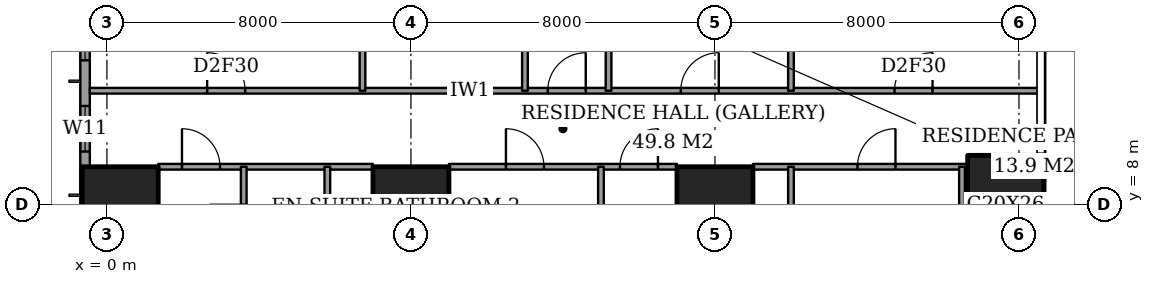
"""IFC4 building model, lengths in metres.
Left out: names, types, materials, properties, quantities, classifications, styles, units other than length and angle.
Written with IfcOpenShell. Run it as: python <this file> out.ifc"""

import sys

from ifc_helpers import new_model, si_unit, direction, frame, frame_2d, origin, origin_2d, place, context, subcontext, project, spatial, rectangle, extrude, element, fill, save


model = new_model("IFC4")
c1 = context("Model", 3, precision=1e-05, world=origin(), true_north=direction((0.0, 1.0)))
c2 = subcontext(c1, "Body", "Model", "MODEL_VIEW")
j1 = project(units=[si_unit("LENGTHUNIT", "METRE"), si_unit("PLANEANGLEUNIT", "RADIAN")], contexts=[c1])
p1 = place(None, origin())
s1 = spatial("IfcSite", under=j1, at=p1, CompositionType="ELEMENT")
p2 = place(p1, origin())
s2 = spatial("IfcBuilding", under=s1, at=p2, CompositionType="ELEMENT")
p3 = place(p2, frame((0.0, 0.0, 146.6)))
s3 = spatial("IfcBuildingStorey", under=s2, at=p3, CompositionType="ELEMENT", Elevation=146.6)
for number, where, z_axis, x_axis in (
    (1, (0.35, 8.0, 0.0), (0.0, 0.0, 1.0), (1.0, 0.0, 0.0)),
    (2, (8.0, 8.0, 0.0), (0.0, 0.0, 1.0), (1.0, 0.0, 0.0)),
    (3, (16.0, 8.0, 0.0), (0.0, 0.0, 1.0), (1.0, 0.0, 0.0)),
):
    element("IfcColumn", number, at=place(p3, frame(where, z_axis=z_axis, x_axis=x_axis)), inside=s3, PredefinedType="COLUMN", context=c2, shape_type="SweptSolid", body=[
        extrude(rectangle(XDim=2.0, YDim=2.0, at=origin_2d()), origin(), (0.0, 0.0, 1.0), 3.6),
    ])
p4 = place(p3, frame((23.65, 8.0, 0.0), z_axis=(0.0, 0.0, 1.0), x_axis=(1.0, 0.0, 0.0)))
e4 = element("IfcColumn", 4, at=p4, inside=s3, PredefinedType="COLUMN", context=c2, shape_type="SweptSolid", body=[
    extrude(rectangle(XDim=2.0, YDim=2.6, at=origin_2d()), origin(), (0.0, 0.0, 1.0), 3.6),
])
p5 = place(p3, frame((-0.575, 44.825, 0.0), z_axis=(0.0, 0.0, 1.0), x_axis=(0.0, -1.0, 0.0)))
e5 = element("IfcWall", 5, at=p5, inside=s3, PredefinedType="SOLIDWALL", context=c2, shape_type="SweptSolid", body=[
    extrude(rectangle(XDim=41.65, YDim=0.25, at=frame_2d((20.825, 0.0))), origin(), (0.0, 0.0, 1.0), 3.6),
])
p6 = place(p5, frame((0.775, 0.0, 0.4)))
e6 = element("IfcOpeningElement", 6, at=p6, cuts=e5, PredefinedType="OPENING", context=c2, shape_type="SweptSolid", body=[
    extrude(rectangle(XDim=2.4, YDim=2.2, at=frame_2d((1.2, 1.1))), frame((0.0, 0.135, 0.0), z_axis=(0.0, -1.0, 0.0), x_axis=(1.0, 0.0, 0.0)), (0.0, 0.0, 1.0), 0.27),
])
p7 = place(p5, frame((6.1, 0.0, 0.4)))
e7 = element("IfcOpeningElement", 7, at=p7, cuts=e5, PredefinedType="OPENING", context=c2, shape_type="SweptSolid", body=[
    extrude(rectangle(XDim=1.2, YDim=2.2, at=frame_2d((0.6, 1.1))), frame((0.0, 0.135, 0.0), z_axis=(0.0, -1.0, 0.0), x_axis=(1.0, 0.0, 0.0)), (0.0, 0.0, 1.0), 0.27),
])
p8 = place(p5, frame((8.425, 0.0, 0.4)))
e8 = element("IfcOpeningElement", 8, at=p8, cuts=e5, PredefinedType="OPENING", context=c2, shape_type="SweptSolid", body=[
    extrude(rectangle(XDim=2.4, YDim=2.2, at=frame_2d((1.2, 1.1))), frame((0.0, 0.135, 0.0), z_axis=(0.0, -1.0, 0.0), x_axis=(1.0, 0.0, 0.0)), (0.0, 0.0, 1.0), 0.27),
])
p9 = place(p5, frame((15.625, 0.0, 0.4)))
e9 = element("IfcOpeningElement", 9, at=p9, cuts=e5, PredefinedType="OPENING", context=c2, shape_type="SweptSolid", body=[
    extrude(rectangle(XDim=2.4, YDim=2.2, at=frame_2d((1.2, 1.1))), frame((0.0, 0.135, 0.0), z_axis=(0.0, -1.0, 0.0), x_axis=(1.0, 0.0, 0.0)), (0.0, 0.0, 1.0), 0.27),
])
p10 = place(p5, frame((23.625, 0.0, 0.4)))
e10 = element("IfcOpeningElement", 10, at=p10, cuts=e5, PredefinedType="OPENING", context=c2, shape_type="SweptSolid", body=[
    extrude(rectangle(XDim=2.4, YDim=2.2, at=frame_2d((1.2, 1.1))), frame((0.0, 0.135, 0.0), z_axis=(0.0, -1.0, 0.0), x_axis=(1.0, 0.0, 0.0)), (0.0, 0.0, 1.0), 0.27),
])
p11 = place(p5, frame((30.625, 0.0, 0.4)))
e11 = element("IfcOpeningElement", 11, at=p11, cuts=e5, PredefinedType="OPENING", context=c2, shape_type="SweptSolid", body=[
    extrude(rectangle(XDim=2.4, YDim=2.2, at=frame_2d((1.2, 1.1))), frame((0.0, 0.135, 0.0), z_axis=(0.0, -1.0, 0.0), x_axis=(1.0, 0.0, 0.0)), (0.0, 0.0, 1.0), 0.27),
])
p12 = place(p5, frame((34.225, 0.0, 0.4)))
e12 = element("IfcOpeningElement", 12, at=p12, cuts=e5, PredefinedType="OPENING", context=c2, shape_type="SweptSolid", body=[
    extrude(rectangle(XDim=1.2, YDim=2.2, at=frame_2d((0.6, 1.1))), frame((0.0, 0.135, 0.0), z_axis=(0.0, -1.0, 0.0), x_axis=(1.0, 0.0, 0.0)), (0.0, 0.0, 1.0), 0.27),
])
p13 = place(p5, frame((38.475, 0.0, 0.4)))
e13 = element("IfcOpeningElement", 13, at=p13, cuts=e5, PredefinedType="OPENING", context=c2, shape_type="SweptSolid", body=[
    extrude(rectangle(XDim=2.4, YDim=2.2, at=frame_2d((1.2, 1.1))), frame((0.0, 0.135, 0.0), z_axis=(0.0, -1.0, 0.0), x_axis=(1.0, 0.0, 0.0)), (0.0, 0.0, 1.0), 0.27),
])
p14 = place(p3, frame((1.35, 9.0, 0.0), z_axis=(0.0, 0.0, 1.0), x_axis=(1.0, 0.0, 0.0)))
e14 = element("IfcWall", 14, at=p14, inside=s3, PredefinedType="PARTITIONING", context=c2, shape_type="SweptSolid", body=[
    extrude(rectangle(XDim=5.65, YDim=0.15, at=frame_2d((2.825, 0.0))), origin(), (0.0, 0.0, 1.0), 3.35),
])
p15 = place(p14, frame((0.625, 0.0, 0.0)))
e15 = element("IfcOpeningElement", 15, at=p15, cuts=e14, PredefinedType="OPENING", context=c2, shape_type="SweptSolid", body=[
    extrude(rectangle(XDim=1.0, YDim=2.1, at=frame_2d((0.5, 1.05))), frame((0.0, 0.085, 0.0), z_axis=(0.0, -1.0, 0.0), x_axis=(1.0, 0.0, 0.0)), (0.0, 0.0, 1.0), 0.17),
])
p16 = place(p3, frame((9.0, 9.0, 0.0), z_axis=(0.0, 0.0, 1.0), x_axis=(1.0, 0.0, 0.0)))
e16 = element("IfcWall", 16, at=p16, inside=s3, PredefinedType="PARTITIONING", context=c2, shape_type="SweptSolid", body=[
    extrude(rectangle(XDim=6.0, YDim=0.15, at=frame_2d((3.0, 0.0))), origin(), (0.0, 0.0, 1.0), 3.35),
])
p17 = place(p16, frame((1.5, 0.0, 0.0)))
e17 = element("IfcOpeningElement", 17, at=p17, cuts=e16, PredefinedType="OPENING", context=c2, shape_type="SweptSolid", body=[
    extrude(rectangle(XDim=1.0, YDim=2.1, at=frame_2d((0.5, 1.05))), frame((0.0, 0.085, 0.0), z_axis=(0.0, -1.0, 0.0), x_axis=(1.0, 0.0, 0.0)), (0.0, 0.0, 1.0), 0.17),
])
p18 = place(p16, frame((4.5, 0.0, 0.0)))
e18 = element("IfcOpeningElement", 18, at=p18, cuts=e16, PredefinedType="OPENING", context=c2, shape_type="SweptSolid", body=[
    extrude(rectangle(XDim=1.0, YDim=2.1, at=frame_2d((0.5, 1.05))), frame((0.0, 0.085, 0.0), z_axis=(0.0, -1.0, 0.0), x_axis=(1.0, 0.0, 0.0)), (0.0, 0.0, 1.0), 0.17),
])
p19 = place(p3, frame((17.0, 9.0, 0.0), z_axis=(0.0, 0.0, 1.0), x_axis=(1.0, 0.0, 0.0)))
e19 = element("IfcWall", 19, at=p19, inside=s3, PredefinedType="PARTITIONING", context=c2, shape_type="SweptSolid", body=[
    extrude(rectangle(XDim=5.65, YDim=0.15, at=frame_2d((2.825, 0.0))), origin(), (0.0, 0.0, 1.0), 3.35),
])
p20 = place(p19, frame((2.75, 0.0, 0.0)))
e20 = element("IfcOpeningElement", 20, at=p20, cuts=e19, PredefinedType="OPENING", context=c2, shape_type="SweptSolid", body=[
    extrude(rectangle(XDim=1.0, YDim=2.1, at=frame_2d((0.5, 1.05))), frame((0.0, 0.085, 0.0), z_axis=(0.0, -1.0, 0.0), x_axis=(1.0, 0.0, 0.0)), (0.0, 0.0, 1.0), 0.17),
])
p21 = place(p3, frame((-0.45, 11.0, 0.0), z_axis=(0.0, 0.0, 1.0), x_axis=(1.0, 0.0, 0.0)))
e21 = element("IfcWall", 21, at=p21, inside=s3, PredefinedType="PARTITIONING", context=c2, shape_type="SweptSolid", body=[
    extrude(rectangle(XDim=25.011, YDim=0.15, at=frame_2d((12.505, 0.0))), origin(), (0.0, 0.0, 1.0), 3.35),
])
p22 = place(p21, frame((12.05, 0.0, 0.0)))
e22 = element("IfcOpeningElement", 22, at=p22, cuts=e21, PredefinedType="OPENING", context=c2, shape_type="SweptSolid", body=[
    extrude(rectangle(XDim=1.0, YDim=2.1, at=frame_2d((0.5, 1.05))), frame((0.0, 0.085, 0.0), z_axis=(0.0, -1.0, 0.0), x_axis=(1.0, 0.0, 0.0)), (0.0, 0.0, 1.0), 0.17),
])
p23 = place(p21, frame((3.087, 0.0, 0.0)))
e23 = element("IfcOpeningElement", 23, at=p23, cuts=e21, PredefinedType="OPENING", context=c2, shape_type="SweptSolid", body=[
    extrude(rectangle(XDim=1.0, YDim=2.1, at=frame_2d((0.5, 1.05))), frame((0.0, 0.085, 0.0), z_axis=(0.0, -1.0, 0.0), x_axis=(1.0, 0.0, 0.0)), (0.0, 0.0, 1.0), 0.17),
])
p24 = place(p21, frame((15.55, 0.0, 0.0)))
e24 = element("IfcOpeningElement", 24, at=p24, cuts=e21, PredefinedType="OPENING", context=c2, shape_type="SweptSolid", body=[
    extrude(rectangle(XDim=1.0, YDim=2.1, at=frame_2d((0.5, 1.05))), frame((0.0, 0.085, 0.0), z_axis=(0.0, -1.0, 0.0), x_axis=(1.0, 0.0, 0.0)), (0.0, 0.0, 1.0), 0.17),
])
p25 = place(p21, frame((21.175, 0.0, 0.0)))
e25 = element("IfcOpeningElement", 25, at=p25, cuts=e21, PredefinedType="OPENING", context=c2, shape_type="SweptSolid", body=[
    extrude(rectangle(XDim=1.0, YDim=2.1, at=frame_2d((0.5, 1.05))), frame((0.0, 0.085, 0.0), z_axis=(0.0, -1.0, 0.0), x_axis=(1.0, 0.0, 0.0)), (0.0, 0.0, 1.0), 0.17),
])
p26 = place(p3, frame((3.6, 6.1, 0.0), z_axis=(0.0, 0.0, 1.0), x_axis=(0.0, 1.0, 0.0)))
e26 = element("IfcWall", 26, at=p26, inside=s3, PredefinedType="PARTITIONING", context=c2, shape_type="SweptSolid", body=[
    extrude(rectangle(XDim=2.9, YDim=0.15, at=frame_2d((1.45, 0.0))), origin(), (0.0, 0.0, 1.0), 3.35),
])
p27 = place(p26, frame((1.0, 0.0, 0.0)))
e27 = element("IfcOpeningElement", 27, at=p27, cuts=e26, PredefinedType="OPENING", context=c2, shape_type="SweptSolid", body=[
    extrude(rectangle(XDim=0.9, YDim=2.1, at=frame_2d((0.45, 1.05))), frame((0.0, 0.085, 0.0), z_axis=(0.0, -1.0, 0.0), x_axis=(1.0, 0.0, 0.0)), (0.0, 0.0, 1.0), 0.17),
])
p28 = place(p3, frame((5.8, -0.45, 0.0), z_axis=(0.0, 0.0, 1.0), x_axis=(0.0, 1.0, 0.0)))
e28 = element("IfcWall", 28, at=p28, inside=s3, PredefinedType="PARTITIONING", context=c2, shape_type="SweptSolid", body=[
    extrude(rectangle(XDim=9.45, YDim=0.15, at=frame_2d((4.725, 0.0))), origin(), (0.0, 0.0, 1.0), 3.35),
])
p29 = place(p3, frame((6.725, 11.0, 0.0), z_axis=(0.0, 0.0, 1.0), x_axis=(0.0, 1.0, 0.0)))
e29 = element("IfcWall", 29, at=p29, inside=s3, PredefinedType="PARTITIONING", context=c2, shape_type="SweptSolid", body=[
    extrude(rectangle(XDim=3.8, YDim=0.15, at=frame_2d((1.9, 0.0))), origin(), (0.0, 0.0, 1.0), 3.35),
])
p30 = place(p29, frame((1.15, 0.0, 0.0)))
e30 = element("IfcOpeningElement", 30, at=p30, cuts=e29, PredefinedType="OPENING", context=c2, shape_type="SweptSolid", body=[
    extrude(rectangle(XDim=0.9, YDim=2.1, at=frame_2d((0.45, 1.05))), frame((0.0, 0.085, 0.0), z_axis=(0.0, -1.0, 0.0), x_axis=(1.0, 0.0, 0.0)), (0.0, 0.0, 1.0), 0.17),
])
p31 = place(p3, frame((11.0, 11.0, 0.0), z_axis=(0.0, 0.0, 1.0), x_axis=(0.0, 1.0, 0.0)))
e31 = element("IfcWall", 31, at=p31, inside=s3, PredefinedType="PARTITIONING", context=c2, shape_type="SweptSolid", body=[
    extrude(rectangle(XDim=10.6, YDim=0.15, at=frame_2d((5.3, 0.0))), origin(), (0.0, 0.0, 1.0), 3.35),
])
p32 = place(p31, frame((7.962, 0.0, 0.0)))
e32 = element("IfcOpeningElement", 32, at=p32, cuts=e31, PredefinedType="OPENING", context=c2, shape_type="SweptSolid", body=[
    extrude(rectangle(XDim=1.0, YDim=2.1, at=frame_2d((0.5, 1.05))), frame((0.0, 0.085, 0.0), z_axis=(0.0, -1.0, 0.0), x_axis=(1.0, 0.0, 0.0)), (0.0, 0.0, 1.0), 0.17),
])
p33 = place(p3, frame((13.0, -0.45, 0.0), z_axis=(0.0, 0.0, 1.0), x_axis=(0.0, 1.0, 0.0)))
e33 = element("IfcWall", 33, at=p33, inside=s3, PredefinedType="PARTITIONING", context=c2, shape_type="SweptSolid", body=[
    extrude(rectangle(XDim=9.45, YDim=0.15, at=frame_2d((4.725, 0.0))), origin(), (0.0, 0.0, 1.0), 3.35),
])
p34 = place(p3, frame((13.2, 11.0, 0.0), z_axis=(0.0, 0.0, 1.0), x_axis=(0.0, 1.0, 0.0)))
e34 = element("IfcWall", 34, at=p34, inside=s3, PredefinedType="PARTITIONING", context=c2, shape_type="SweptSolid", body=[
    extrude(rectangle(XDim=6.325, YDim=0.15, at=frame_2d((3.163, 0.0))), origin(), (0.0, 0.0, 1.0), 3.35),
])
p35 = place(p3, frame((18.0, -0.45, 0.0), z_axis=(0.0, 0.0, 1.0), x_axis=(0.0, 1.0, 0.0)))
e35 = element("IfcWall", 35, at=p35, inside=s3, PredefinedType="PARTITIONING", context=c2, shape_type="SweptSolid", body=[
    extrude(rectangle(XDim=9.45, YDim=0.15, at=frame_2d((4.725, 0.0))), origin(), (0.0, 0.0, 1.0), 3.35),
])
p36 = place(p3, frame((18.0, 11.0, 0.0), z_axis=(0.0, 0.0, 1.0), x_axis=(0.0, 1.0, 0.0)))
e36 = element("IfcWall", 36, at=p36, inside=s3, PredefinedType="PARTITIONING", context=c2, shape_type="SweptSolid", body=[
    extrude(rectangle(XDim=6.325, YDim=0.15, at=frame_2d((3.163, 0.0))), origin(), (0.0, 0.0, 1.0), 3.35),
])
p37 = place(p3, frame((22.5, -0.45, 0.0), z_axis=(0.0, 0.0, 1.0), x_axis=(0.0, 1.0, 0.0)))
e37 = element("IfcWall", 37, at=p37, inside=s3, PredefinedType="PARTITIONING", context=c2, shape_type="SweptSolid", body=[
    extrude(rectangle(XDim=9.45, YDim=0.15, at=frame_2d((4.725, 0.0))), origin(), (0.0, 0.0, 1.0), 3.35),
])
p38 = place(p37, frame((4.275, 0.0, 0.0)))
e38 = element("IfcOpeningElement", 38, at=p38, cuts=e37, PredefinedType="OPENING", context=c2, shape_type="SweptSolid", body=[
    extrude(rectangle(XDim=0.9, YDim=2.1, at=frame_2d((0.45, 1.05))), frame((0.0, 0.085, 0.0), z_axis=(0.0, -1.0, 0.0), x_axis=(1.0, 0.0, 0.0)), (0.0, 0.0, 1.0), 0.17),
])
p39 = place(p11, origin())
e39 = element("IfcWindow", 39, at=p39, inside=s3, PartitioningType="SINGLE_PANEL", PredefinedType="WINDOW", context=c2, shape_type="SweptSolid", body=[
    extrude(rectangle(XDim=2.4, YDim=2.2, at=frame_2d((1.2, 1.1))), frame((0.0, 0.03, 0.0), z_axis=(0.0, -1.0, 0.0), x_axis=(1.0, 0.0, 0.0)), (0.0, 0.0, 1.0), 0.06),
])
fill(e11, e39)
p40 = place(p12, origin())
e40 = element("IfcWindow", 40, at=p40, inside=s3, PartitioningType="SINGLE_PANEL", PredefinedType="WINDOW", context=c2, shape_type="SweptSolid", body=[
    extrude(rectangle(XDim=1.2, YDim=2.2, at=frame_2d((0.6, 1.1))), frame((0.0, 0.03, 0.0), z_axis=(0.0, -1.0, 0.0), x_axis=(1.0, 0.0, 0.0)), (0.0, 0.0, 1.0), 0.06),
])
fill(e12, e40)
p41 = place(p15, origin())
e41 = element("IfcDoor", 41, at=p41, inside=s3, OperationType="SINGLE_SWING_RIGHT", PredefinedType="DOOR", context=c2, shape_type="SweptSolid", body=[
    extrude(rectangle(XDim=1.0, YDim=2.1, at=frame_2d((0.5, 1.05))), frame((0.0, 0.025, 0.0), z_axis=(0.0, -1.0, 0.0), x_axis=(1.0, 0.0, 0.0)), (0.0, 0.0, 1.0), 0.05),
])
fill(e15, e41)
p42 = place(p17, origin())
e42 = element("IfcDoor", 42, at=p42, inside=s3, OperationType="SINGLE_SWING_RIGHT", PredefinedType="DOOR", context=c2, shape_type="SweptSolid", body=[
    extrude(rectangle(XDim=1.0, YDim=2.1, at=frame_2d((0.5, 1.05))), frame((0.0, 0.025, 0.0), z_axis=(0.0, -1.0, 0.0), x_axis=(1.0, 0.0, 0.0)), (0.0, 0.0, 1.0), 0.05),
])
fill(e17, e42)
p43 = place(p18, origin())
e43 = element("IfcDoor", 43, at=p43, inside=s3, OperationType="SINGLE_SWING_LEFT", PredefinedType="DOOR", context=c2, shape_type="SweptSolid", body=[
    extrude(rectangle(XDim=1.0, YDim=2.1, at=frame_2d((0.5, 1.05))), frame((0.0, 0.025, 0.0), z_axis=(0.0, -1.0, 0.0), x_axis=(1.0, 0.0, 0.0)), (0.0, 0.0, 1.0), 0.05),
])
fill(e18, e43)
p44 = place(p20, origin())
e44 = element("IfcDoor", 44, at=p44, inside=s3, OperationType="SINGLE_SWING_LEFT", PredefinedType="DOOR", context=c2, shape_type="SweptSolid", body=[
    extrude(rectangle(XDim=1.0, YDim=2.1, at=frame_2d((0.5, 1.05))), frame((0.0, 0.025, 0.0), z_axis=(0.0, -1.0, 0.0), x_axis=(1.0, 0.0, 0.0)), (0.0, 0.0, 1.0), 0.05),
])
fill(e20, e44)
p45 = place(p22, origin())
e45 = element("IfcDoor", 45, at=p45, inside=s3, OperationType="SINGLE_SWING_LEFT", PredefinedType="DOOR", context=c2, shape_type="SweptSolid", body=[
    extrude(rectangle(XDim=1.0, YDim=2.1, at=frame_2d((0.5, 1.05))), frame((0.0, 0.025, 0.0), z_axis=(0.0, -1.0, 0.0), x_axis=(1.0, 0.0, 0.0)), (0.0, 0.0, 1.0), 0.05),
])
fill(e22, e45)
p46 = place(p23, origin())
e46 = element("IfcDoor", 46, at=p46, inside=s3, OperationType="SINGLE_SWING_RIGHT", PredefinedType="DOOR", context=c2, shape_type="SweptSolid", body=[
    extrude(rectangle(XDim=1.0, YDim=2.1, at=frame_2d((0.5, 1.05))), frame((0.0, 0.025, 0.0), z_axis=(0.0, -1.0, 0.0), x_axis=(1.0, 0.0, 0.0)), (0.0, 0.0, 1.0), 0.05),
])
fill(e23, e46)
p47 = place(p24, origin())
e47 = element("IfcDoor", 47, at=p47, inside=s3, OperationType="SINGLE_SWING_LEFT", PredefinedType="DOOR", context=c2, shape_type="SweptSolid", body=[
    extrude(rectangle(XDim=1.0, YDim=2.1, at=frame_2d((0.5, 1.05))), frame((0.0, 0.025, 0.0), z_axis=(0.0, -1.0, 0.0), x_axis=(1.0, 0.0, 0.0)), (0.0, 0.0, 1.0), 0.05),
])
fill(e24, e47)
p48 = place(p25, origin())
e48 = element("IfcDoor", 48, at=p48, inside=s3, OperationType="SINGLE_SWING_LEFT", PredefinedType="DOOR", context=c2, shape_type="SweptSolid", body=[
    extrude(rectangle(XDim=1.0, YDim=2.1, at=frame_2d((0.5, 1.05))), frame((0.0, 0.025, 0.0), z_axis=(0.0, -1.0, 0.0), x_axis=(1.0, 0.0, 0.0)), (0.0, 0.0, 1.0), 0.05),
])
fill(e25, e48)
save(model, sys.argv[1])
